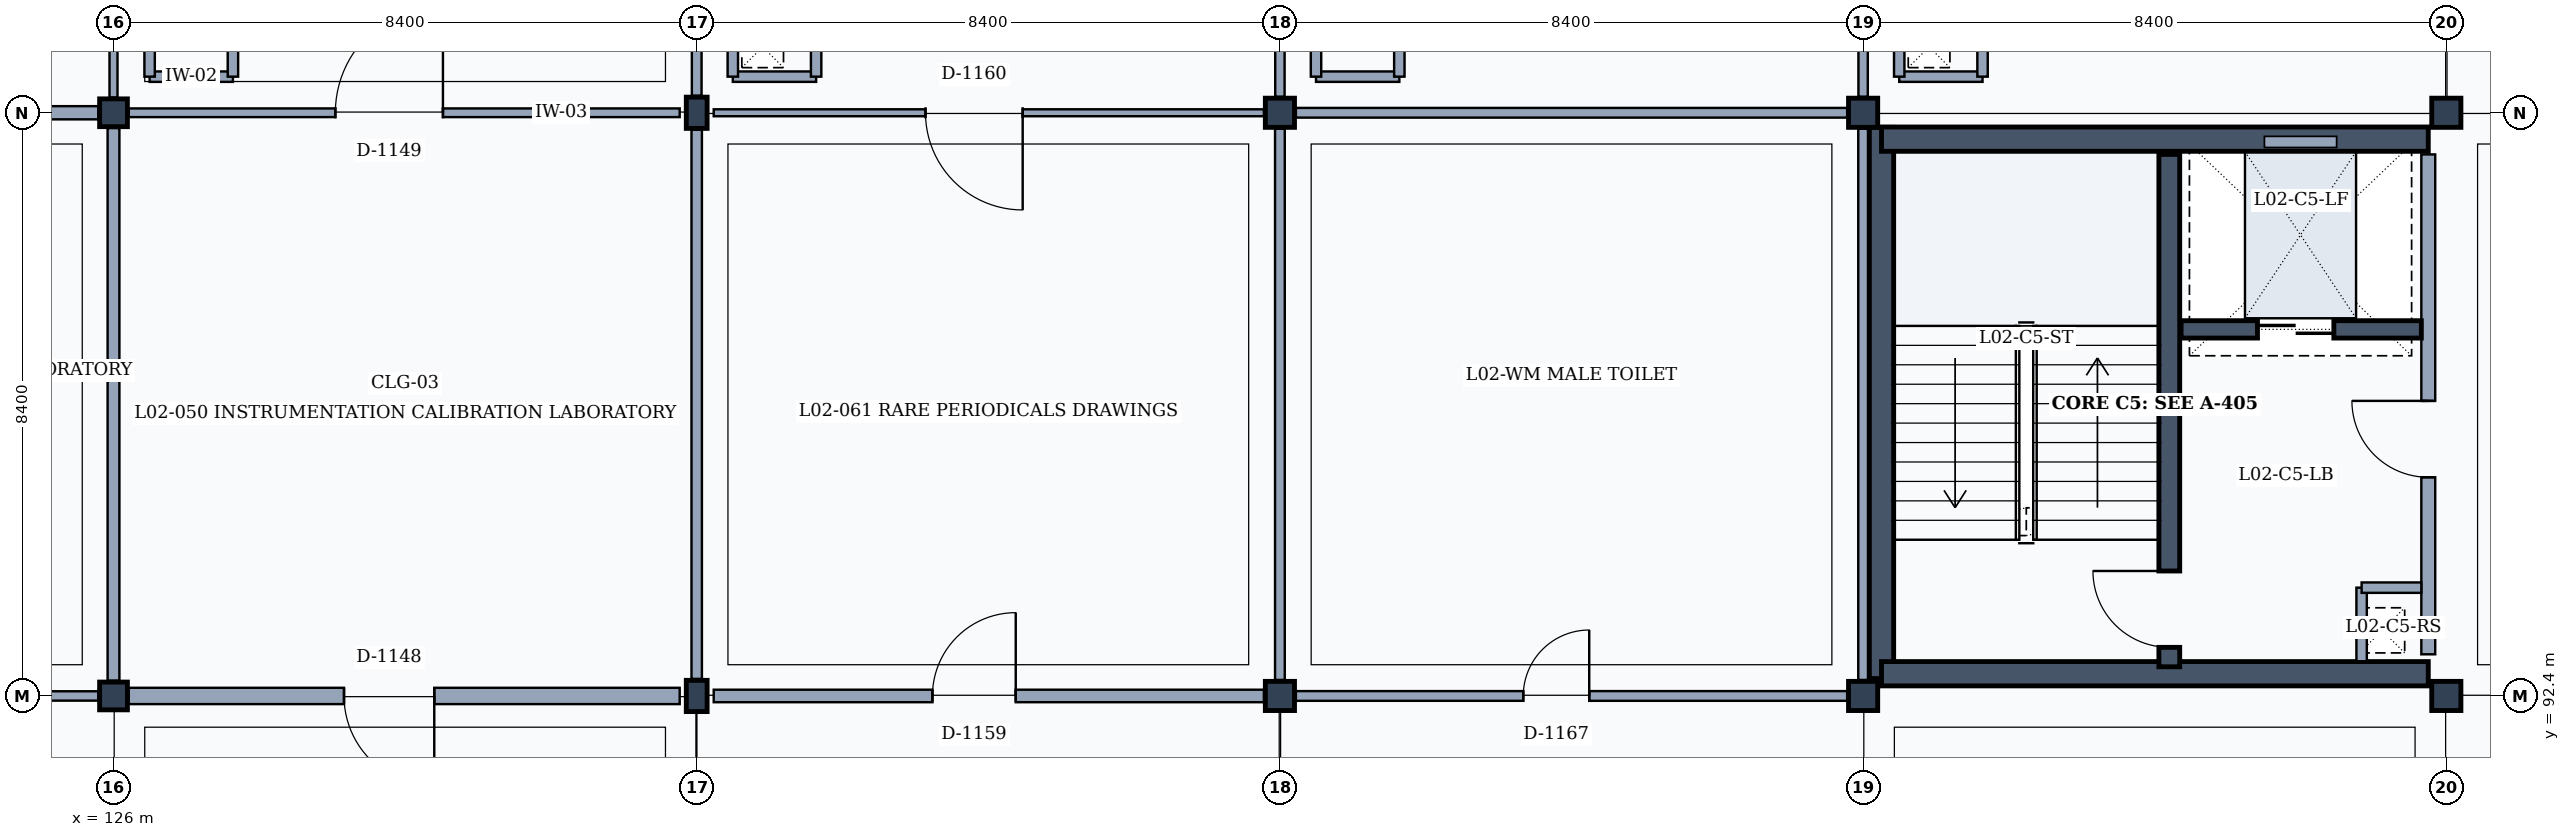
"""IFC4 building model, lengths in metres.
Left out: names, types, materials, properties, quantities, classifications, styles, units other than length and angle.
Written with IfcOpenShell. Run it as: python <this file> out.ifc"""

import sys

from ifc_helpers import new_model, si_unit, direction, frame, frame_2d, origin, origin_2d, place, context, subcontext, project, spatial, rectangle, i_section, extrude, element, fill, save


model = new_model("IFC4")
c1 = context("Model", 3, precision=1e-05, world=origin(), true_north=direction((0.0, 1.0)))
c2 = subcontext(c1, "Body", "Model", "MODEL_VIEW")
j1 = project(units=[si_unit("LENGTHUNIT", "METRE"), si_unit("PLANEANGLEUNIT", "RADIAN")], contexts=[c1])
p1 = place(None, origin())
s1 = spatial("IfcSite", under=j1, at=p1, CompositionType="ELEMENT")
p2 = place(p1, origin())
s2 = spatial("IfcBuilding", under=s1, at=p2, CompositionType="ELEMENT")
p3 = place(p2, frame((0.0, 0.0, 9.6)))
s3 = spatial("IfcBuildingStorey", under=s2, at=p3, CompositionType="ELEMENT", Elevation=9.6)
for number, where, z_axis, x_axis in (
    (1, (126.0, 92.4, 0.0), (0.0, 0.0, 1.0), (1.0, 0.0, 0.0)),
    (2, (126.0, 100.8, 0.0), (0.0, 0.0, 1.0), (1.0, 0.0, 0.0)),
):
    element("IfcColumn", number, at=place(p3, frame(where, z_axis=z_axis, x_axis=x_axis)), inside=s3, PredefinedType="COLUMN", context=c2, shape_type="SweptSolid", body=[
        extrude(rectangle(XDim=0.4, YDim=0.4, at=origin_2d()), origin(), (0.0, 0.0, 1.0), 4.2),
    ])
for number, where, z_axis, x_axis in (
    (3, (134.4, 92.4, 0.0), (0.0, 0.0, 1.0), (1.0, 0.0, 0.0)),
    (4, (134.4, 100.8, 0.0), (0.0, 0.0, 1.0), (1.0, 0.0, 0.0)),
):
    element("IfcColumn", number, at=place(p3, frame(where, z_axis=z_axis, x_axis=x_axis)), inside=s3, PredefinedType="COLUMN", context=c2, shape_type="SweptSolid", body=[
        extrude(i_section(OverallWidth=0.3, OverallDepth=0.45, WebThickness=0.014, FlangeThickness=0.026, FilletRadius=0.027, at=origin_2d()), origin(), (0.0, 0.0, 1.0), 4.2),
    ])
for number, where, z_axis, x_axis in (
    (5, (142.8, 92.4, 0.0), (0.0, 0.0, 1.0), (1.0, 0.0, 0.0)),
    (6, (142.8, 100.8, 0.0), (0.0, 0.0, 1.0), (1.0, 0.0, 0.0)),
    (7, (151.2, 92.4, 0.0), (0.0, 0.0, 1.0), (1.0, 0.0, 0.0)),
    (8, (151.2, 100.8, 0.0), (0.0, 0.0, 1.0), (1.0, 0.0, 0.0)),
    (9, (159.6, 92.4, 0.0), (0.0, 0.0, 1.0), (1.0, 0.0, 0.0)),
    (10, (159.6, 100.8, 0.0), (0.0, 0.0, 1.0), (1.0, 0.0, 0.0)),
):
    element("IfcColumn", number, at=place(p3, frame(where, z_axis=z_axis, x_axis=x_axis)), inside=s3, PredefinedType="COLUMN", context=c2, shape_type="SweptSolid", body=[
        extrude(rectangle(XDim=0.42, YDim=0.42, at=origin_2d()), origin(), (0.0, 0.0, 1.0), 4.2),
    ])
p4 = place(p3, frame((151.465, 92.65, 0.0), z_axis=(0.0, 0.0, 1.0), x_axis=(0.0, 1.0, 0.0)))
e11 = element("IfcWall", 11, at=p4, inside=s3, PredefinedType="SHEAR", context=c2, shape_type="SweptSolid", body=[
    extrude(rectangle(XDim=7.94, YDim=0.35, at=frame_2d((3.97, 0.0))), origin(), (0.0, 0.0, 1.0), 3.96),
])
p5 = place(p3, frame((151.465, 100.42, 0.0), z_axis=(0.0, 0.0, 1.0), x_axis=(1.0, 0.0, 0.0)))
e12 = element("IfcWall", 12, at=p5, inside=s3, PredefinedType="SHEAR", context=c2, shape_type="SweptSolid", body=[
    extrude(rectangle(XDim=7.875, YDim=0.35, at=frame_2d((3.938, 0.0))), origin(), (0.0, 0.0, 1.0), 3.96),
])
p6 = place(p3, frame((159.34, 100.2, 0.0), z_axis=(0.0, 0.0, 1.0), x_axis=(0.0, -1.0, 0.0)))
e13 = element("IfcWall", 13, at=p6, inside=s3, PredefinedType="PARTITIONING", context=c2, shape_type="SweptSolid", body=[
    extrude(rectangle(XDim=7.2, YDim=0.2, at=frame_2d((3.6, 0.0))), origin(), (0.0, 0.0, 1.0), 3.32),
])
p7 = place(p6, frame((3.55, 0.0, 0.0)))
e14 = element("IfcOpeningElement", 14, at=p7, cuts=e13, PredefinedType="OPENING", context=c2, shape_type="SweptSolid", body=[
    extrude(rectangle(XDim=1.1, YDim=2.15, at=frame_2d((0.55, 1.075))), frame((0.0, 0.11, 0.0), z_axis=(0.0, -1.0, 0.0), x_axis=(1.0, 0.0, 0.0)), (0.0, 0.0, 1.0), 0.22),
])
p8 = place(p3, frame((159.34, 92.72, 0.0), z_axis=(0.0, 0.0, 1.0), x_axis=(-1.0, 0.0, 0.0)))
e15 = element("IfcWall", 15, at=p8, inside=s3, PredefinedType="SHEAR", context=c2, shape_type="SweptSolid", body=[
    extrude(rectangle(XDim=7.875, YDim=0.35, at=frame_2d((3.938, 0.0))), origin(), (0.0, 0.0, 1.0), 3.96),
])
p9 = place(p3, frame((155.61, 92.82, 0.0), z_axis=(0.0, 0.0, 1.0), x_axis=(0.0, 1.0, 0.0)))
e16 = element("IfcWall", 16, at=p9, inside=s3, PredefinedType="SHEAR", context=c2, shape_type="SweptSolid", body=[
    extrude(rectangle(XDim=7.38, YDim=0.3, at=frame_2d((3.69, 0.0))), origin(), (0.0, 0.0, 1.0), 3.96),
])
p10 = place(p9, frame((0.28, 0.0, 0.0)))
e17 = element("IfcOpeningElement", 17, at=p10, cuts=e16, PredefinedType="OPENING", context=c2, shape_type="SweptSolid", body=[
    extrude(rectangle(XDim=1.1, YDim=2.15, at=frame_2d((0.55, 1.075))), frame((0.0, 0.16, 0.0), z_axis=(0.0, -1.0, 0.0), x_axis=(1.0, 0.0, 0.0)), (0.0, 0.0, 1.0), 0.32),
])
p11 = place(p3, frame((158.38, 93.96, 0.0), z_axis=(0.0, 0.0, 1.0), x_axis=(0.0, -1.0, 0.0)))
e18 = element("IfcWall", 18, at=p11, inside=s3, PredefinedType="PARTITIONING", context=c2, shape_type="SweptSolid", body=[
    extrude(rectangle(XDim=1.06, YDim=0.15, at=frame_2d((0.53, 0.0))), origin(), (0.0, 0.0, 1.0), 3.32),
])
p12 = place(p3, frame((158.38, 93.96, 0.0), z_axis=(0.0, 0.0, 1.0), x_axis=(1.0, 0.0, 0.0)))
e19 = element("IfcWall", 19, at=p12, inside=s3, PredefinedType="PARTITIONING", context=c2, shape_type="SweptSolid", body=[
    extrude(rectangle(XDim=0.86, YDim=0.15, at=frame_2d((0.43, 0.0))), origin(), (0.0, 0.0, 1.0), 3.32),
])
p13 = place(p3, frame((155.78, 97.68, 0.0), z_axis=(0.0, 0.0, 1.0), x_axis=(1.0, 0.0, 0.0)))
e20 = element("IfcWall", 20, at=p13, inside=s3, PredefinedType="SHEAR", context=c2, shape_type="SweptSolid", body=[
    extrude(rectangle(XDim=3.46, YDim=0.25, at=frame_2d((1.73, 0.0))), origin(), (0.0, 0.0, 1.0), 3.96),
])
p14 = place(p13, frame((1.1, 0.0, 0.0)))
e21 = element("IfcOpeningElement", 21, at=p14, cuts=e20, PredefinedType="OPENING", context=c2, shape_type="SweptSolid", body=[
    extrude(rectangle(XDim=1.1, YDim=2.15, at=frame_2d((0.55, 1.075))), frame((0.0, 0.135, 0.0), z_axis=(0.0, -1.0, 0.0), x_axis=(1.0, 0.0, 0.0)), (0.0, 0.0, 1.0), 0.27),
])
for number, where, z_axis, x_axis in (
    (22, (126.52, 101.32, 0.0), (0.0, 0.0, 1.0), (1.0, 0.0, 0.0)),
    (23, (127.72, 101.32, 0.0), (0.0, 0.0, 1.0), (0.0, 1.0, 0.0)),
    (24, (126.52, 102.52, 0.0), (0.0, 0.0, 1.0), (0.0, -1.0, 0.0)),
):
    element("IfcWall", number, at=place(p3, frame(where, z_axis=z_axis, x_axis=x_axis)), inside=s3, PredefinedType="PARTITIONING", context=c2, shape_type="SweptSolid", body=[
        extrude(rectangle(XDim=1.2, YDim=0.15, at=frame_2d((0.6, 0.0))), origin(), (0.0, 0.0, 1.0), 3.96),
    ])
p15 = place(p3, frame((134.92, 101.32, 0.0), z_axis=(0.0, 0.0, 1.0), x_axis=(1.0, 0.0, 0.0)))
e25 = element("IfcWall", 25, at=p15, inside=s3, PredefinedType="PARTITIONING", context=c2, shape_type="SweptSolid", body=[
    extrude(rectangle(XDim=1.2, YDim=0.15, at=frame_2d((0.6, 0.0))), origin(), (0.0, 0.0, 1.0), 3.94),
])
for number, where, z_axis, x_axis in (
    (26, (136.12, 101.32, 0.0), (0.0, 0.0, 1.0), (0.0, 1.0, 0.0)),
    (27, (134.92, 102.52, 0.0), (0.0, 0.0, 1.0), (0.0, -1.0, 0.0)),
):
    element("IfcWall", number, at=place(p3, frame(where, z_axis=z_axis, x_axis=x_axis)), inside=s3, PredefinedType="PARTITIONING", context=c2, shape_type="SweptSolid", body=[
        extrude(rectangle(XDim=1.2, YDim=0.15, at=frame_2d((0.6, 0.0))), origin(), (0.0, 0.0, 1.0), 3.94),
    ])
for number, where, z_axis, x_axis in (
    (28, (143.32, 101.32, 0.0), (0.0, 0.0, 1.0), (1.0, 0.0, 0.0)),
    (29, (144.52, 101.32, 0.0), (0.0, 0.0, 1.0), (0.0, 1.0, 0.0)),
    (30, (143.32, 102.52, 0.0), (0.0, 0.0, 1.0), (0.0, -1.0, 0.0)),
    (31, (151.72, 101.32, 0.0), (0.0, 0.0, 1.0), (1.0, 0.0, 0.0)),
    (32, (152.92, 101.32, 0.0), (0.0, 0.0, 1.0), (0.0, 1.0, 0.0)),
    (33, (151.72, 102.52, 0.0), (0.0, 0.0, 1.0), (0.0, -1.0, 0.0)),
):
    element("IfcWall", number, at=place(p3, frame(where, z_axis=z_axis, x_axis=x_axis)), inside=s3, PredefinedType="PARTITIONING", context=c2, shape_type="SweptSolid", body=[
        extrude(rectangle(XDim=1.2, YDim=0.15, at=frame_2d((0.6, 0.0))), origin(), (0.0, 0.0, 1.0), 3.96),
    ])
p16 = place(p3, frame((117.81, 92.4, 0.0), z_axis=(0.0, 0.0, 1.0), x_axis=(1.0, 0.0, 0.0)))
e34 = element("IfcWall", 34, at=p16, inside=s3, PredefinedType="PARTITIONING", context=c2, shape_type="SweptSolid", body=[
    extrude(rectangle(XDim=7.97, YDim=0.135, at=frame_2d((3.985, 0.0))), origin(), (0.0, 0.0, 1.0), 3.32),
])
p17 = place(p16, frame((3.0, 0.0, 0.0)))
e35 = element("IfcOpeningElement", 35, at=p17, cuts=e34, PredefinedType="OPENING", context=c2, shape_type="SweptSolid", body=[
    extrude(rectangle(XDim=1.5, YDim=2.3, at=frame_2d((0.75, 1.15))), frame((0.0, 0.077, 0.0), z_axis=(0.0, -1.0, 0.0), x_axis=(1.0, 0.0, 0.0)), (0.0, 0.0, 1.0), 0.155),
])
p18 = place(p3, frame((126.0, 92.62, 0.0), z_axis=(0.0, 0.0, 1.0), x_axis=(0.0, 1.0, 0.0)))
e36 = element("IfcWall", 36, at=p18, inside=s3, PredefinedType="PARTITIONING", context=c2, shape_type="SweptSolid", body=[
    extrude(rectangle(XDim=7.96, YDim=0.17, at=frame_2d((3.98, 0.0))), origin(), (0.0, 0.0, 1.0), 3.32),
])
p19 = place(p3, frame((117.745, 100.8, 0.0), z_axis=(0.0, 0.0, 1.0), x_axis=(1.0, 0.0, 0.0)))
e37 = element("IfcWall", 37, at=p19, inside=s3, PredefinedType="PARTITIONING", context=c2, shape_type="SweptSolid", body=[
    extrude(rectangle(XDim=8.035, YDim=0.19, at=frame_2d((4.018, 0.0))), origin(), (0.0, 0.0, 1.0), 3.32),
])
p20 = place(p19, frame((2.925, 0.0, 0.0)))
e38 = element("IfcOpeningElement", 38, at=p20, cuts=e37, PredefinedType="OPENING", context=c2, shape_type="SweptSolid", body=[
    extrude(rectangle(XDim=1.65, YDim=2.25, at=frame_2d((0.825, 1.125))), frame((0.0, 0.105, 0.0), z_axis=(0.0, -1.0, 0.0), x_axis=(1.0, 0.0, 0.0)), (0.0, 0.0, 1.0), 0.21),
])
p21 = place(p3, frame((126.0, 101.02, 0.0), z_axis=(0.0, 0.0, 1.0), x_axis=(0.0, 1.0, 0.0)))
e39 = element("IfcWall", 39, at=p21, inside=s3, PredefinedType="PARTITIONING", context=c2, shape_type="SweptSolid", body=[
    extrude(rectangle(XDim=7.96, YDim=0.115, at=frame_2d((3.98, 0.0))), origin(), (0.0, 0.0, 1.0), 3.32),
])
p22 = place(p3, frame((126.22, 92.4, 0.0), z_axis=(0.0, 0.0, 1.0), x_axis=(1.0, 0.0, 0.0)))
e40 = element("IfcWall", 40, at=p22, inside=s3, PredefinedType="PARTITIONING", context=c2, shape_type="SweptSolid", body=[
    extrude(rectangle(XDim=7.935, YDim=0.235, at=frame_2d((3.968, 0.0))), origin(), (0.0, 0.0, 1.0), 3.32),
])
p23 = place(p22, frame((3.1, 0.0, 0.0)))
e41 = element("IfcOpeningElement", 41, at=p23, cuts=e40, PredefinedType="OPENING", context=c2, shape_type="SweptSolid", body=[
    extrude(rectangle(XDim=1.3, YDim=2.2, at=frame_2d((0.65, 1.1))), frame((0.0, 0.127, 0.0), z_axis=(0.0, -1.0, 0.0), x_axis=(1.0, 0.0, 0.0)), (0.0, 0.0, 1.0), 0.255),
])
p24 = place(p3, frame((134.4, 92.645, 0.0), z_axis=(0.0, 0.0, 1.0), x_axis=(0.0, 1.0, 0.0)))
e42 = element("IfcWall", 42, at=p24, inside=s3, PredefinedType="PARTITIONING", context=c2, shape_type="SweptSolid", body=[
    extrude(rectangle(XDim=7.91, YDim=0.15, at=frame_2d((3.955, 0.0))), origin(), (0.0, 0.0, 1.0), 3.32),
])
p25 = place(p3, frame((126.22, 100.8, 0.0), z_axis=(0.0, 0.0, 1.0), x_axis=(1.0, 0.0, 0.0)))
e43 = element("IfcWall", 43, at=p25, inside=s3, PredefinedType="PARTITIONING", context=c2, shape_type="SweptSolid", body=[
    extrude(rectangle(XDim=7.935, YDim=0.125, at=frame_2d((3.968, 0.0))), origin(), (0.0, 0.0, 1.0), 3.32),
])
p26 = place(p25, frame((2.975, 0.0, 0.0)))
e44 = element("IfcOpeningElement", 44, at=p26, cuts=e43, PredefinedType="OPENING", context=c2, shape_type="SweptSolid", body=[
    extrude(rectangle(XDim=1.55, YDim=2.35, at=frame_2d((0.775, 1.175))), frame((0.0, 0.073, 0.0), z_axis=(0.0, -1.0, 0.0), x_axis=(1.0, 0.0, 0.0)), (0.0, 0.0, 1.0), 0.145),
])
p27 = place(p3, frame((134.4, 101.045, 0.0), z_axis=(0.0, 0.0, 1.0), x_axis=(0.0, 1.0, 0.0)))
e45 = element("IfcWall", 45, at=p27, inside=s3, PredefinedType="PARTITIONING", context=c2, shape_type="SweptSolid", body=[
    extrude(rectangle(XDim=7.91, YDim=0.14, at=frame_2d((3.955, 0.0))), origin(), (0.0, 0.0, 1.0), 3.32),
])
p28 = place(p3, frame((134.645, 92.4, 0.0), z_axis=(0.0, 0.0, 1.0), x_axis=(1.0, 0.0, 0.0)))
e46 = element("IfcWall", 46, at=p28, inside=s3, PredefinedType="PARTITIONING", context=c2, shape_type="SweptSolid", body=[
    extrude(rectangle(XDim=7.925, YDim=0.18, at=frame_2d((3.962, 0.0))), origin(), (0.0, 0.0, 1.0), 3.32),
])
p29 = place(p28, frame((3.15, 0.0, 0.0)))
e47 = element("IfcOpeningElement", 47, at=p29, cuts=e46, PredefinedType="OPENING", context=c2, shape_type="SweptSolid", body=[
    extrude(rectangle(XDim=1.2, YDim=2.2, at=frame_2d((0.6, 1.1))), frame((0.0, 0.1, 0.0), z_axis=(0.0, -1.0, 0.0), x_axis=(1.0, 0.0, 0.0)), (0.0, 0.0, 1.0), 0.2),
])
p30 = place(p3, frame((142.8, 92.63, 0.0), z_axis=(0.0, 0.0, 1.0), x_axis=(0.0, 1.0, 0.0)))
e48 = element("IfcWall", 48, at=p30, inside=s3, PredefinedType="PARTITIONING", context=c2, shape_type="SweptSolid", body=[
    extrude(rectangle(XDim=7.94, YDim=0.14, at=frame_2d((3.97, 0.0))), origin(), (0.0, 0.0, 1.0), 3.32),
])
p31 = place(p3, frame((134.645, 100.8, 0.0), z_axis=(0.0, 0.0, 1.0), x_axis=(1.0, 0.0, 0.0)))
e49 = element("IfcWall", 49, at=p31, inside=s3, PredefinedType="MOVABLE", context=c2, shape_type="SweptSolid", body=[
    extrude(rectangle(XDim=7.925, YDim=0.1, at=frame_2d((3.962, 0.0))), origin(), (0.0, 0.0, 1.0), 3.32),
])
p32 = place(p31, frame((3.05, 0.0, 0.0)))
e50 = element("IfcOpeningElement", 50, at=p32, cuts=e49, PredefinedType="OPENING", context=c2, shape_type="SweptSolid", body=[
    extrude(rectangle(XDim=1.4, YDim=2.25, at=frame_2d((0.7, 1.125))), frame((0.0, 0.06, 0.0), z_axis=(0.0, -1.0, 0.0), x_axis=(1.0, 0.0, 0.0)), (0.0, 0.0, 1.0), 0.12),
])
p33 = place(p3, frame((142.8, 101.03, 0.0), z_axis=(0.0, 0.0, 1.0), x_axis=(0.0, 1.0, 0.0)))
e51 = element("IfcWall", 51, at=p33, inside=s3, PredefinedType="PARTITIONING", context=c2, shape_type="SweptSolid", body=[
    extrude(rectangle(XDim=7.94, YDim=0.135, at=frame_2d((3.97, 0.0))), origin(), (0.0, 0.0, 1.0), 3.32),
])
p34 = place(p3, frame((143.03, 92.4, 0.0), z_axis=(0.0, 0.0, 1.0), x_axis=(1.0, 0.0, 0.0)))
e52 = element("IfcWall", 52, at=p34, inside=s3, PredefinedType="PARTITIONING", context=c2, shape_type="SweptSolid", body=[
    extrude(rectangle(XDim=7.94, YDim=0.14, at=frame_2d((3.97, 0.0))), origin(), (0.0, 0.0, 1.0), 3.22),
])
p35 = place(p34, frame((3.275, 0.0, 0.0)))
e53 = element("IfcOpeningElement", 53, at=p35, cuts=e52, PredefinedType="OPENING", context=c2, shape_type="SweptSolid", body=[
    extrude(rectangle(XDim=0.95, YDim=2.15, at=frame_2d((0.475, 1.075))), frame((0.0, 0.08, 0.0), z_axis=(0.0, -1.0, 0.0), x_axis=(1.0, 0.0, 0.0)), (0.0, 0.0, 1.0), 0.16),
])
p36 = place(p3, frame((151.2, 92.63, 0.0), z_axis=(0.0, 0.0, 1.0), x_axis=(0.0, 1.0, 0.0)))
e54 = element("IfcWall", 54, at=p36, inside=s3, PredefinedType="PARTITIONING", context=c2, shape_type="SweptSolid", body=[
    extrude(rectangle(XDim=7.94, YDim=0.14, at=frame_2d((3.97, 0.0))), origin(), (0.0, 0.0, 1.0), 3.32),
])
p37 = place(p3, frame((143.03, 100.8, 0.0), z_axis=(0.0, 0.0, 1.0), x_axis=(1.0, 0.0, 0.0)))
e55 = element("IfcWall", 55, at=p37, inside=s3, PredefinedType="PARTITIONING", context=c2, shape_type="SweptSolid", body=[
    extrude(rectangle(XDim=7.94, YDim=0.14, at=frame_2d((3.97, 0.0))), origin(), (0.0, 0.0, 1.0), 3.22),
])
p38 = place(p3, frame((151.2, 101.03, 0.0), z_axis=(0.0, 0.0, 1.0), x_axis=(0.0, 1.0, 0.0)))
e56 = element("IfcWall", 56, at=p38, inside=s3, PredefinedType="PARTITIONING", context=c2, shape_type="SweptSolid", body=[
    extrude(rectangle(XDim=7.94, YDim=0.135, at=frame_2d((3.97, 0.0))), origin(), (0.0, 0.0, 1.0), 3.32),
])
p39 = place(p38, frame((2.8, 0.0, 0.0)))
e57 = element("IfcOpeningElement", 57, at=p39, cuts=e56, PredefinedType="OPENING", context=c2, shape_type="SweptSolid", body=[
    extrude(rectangle(XDim=1.9, YDim=2.4, at=frame_2d((0.95, 1.2))), frame((0.0, 0.077, 0.0), z_axis=(0.0, -1.0, 0.0), x_axis=(1.0, 0.0, 0.0)), (0.0, 0.0, 1.0), 0.155),
])
p40 = place(p7, frame((1.1, 0.0, 0.0), z_axis=(0.0, 0.0, 1.0), x_axis=(-1.0, 0.0, 0.0)))
e58 = element("IfcDoor", 58, at=p40, inside=s3, OperationType="SINGLE_SWING_RIGHT", PredefinedType="DOOR", context=c2, shape_type="SweptSolid", body=[
    extrude(rectangle(XDim=1.1, YDim=2.15, at=frame_2d((0.55, 1.075))), frame((0.0, 0.025, 0.0), z_axis=(0.0, -1.0, 0.0), x_axis=(1.0, 0.0, 0.0)), (0.0, 0.0, 1.0), 0.05),
])
fill(e14, e58)
p41 = place(p10, origin())
e59 = element("IfcDoor", 59, at=p41, inside=s3, OperationType="SINGLE_SWING_RIGHT", PredefinedType="DOOR", context=c2, shape_type="SweptSolid", body=[
    extrude(rectangle(XDim=1.1, YDim=2.15, at=frame_2d((0.55, 1.075))), frame((0.0, 0.025, 0.0), z_axis=(0.0, -1.0, 0.0), x_axis=(1.0, 0.0, 0.0)), (0.0, 0.0, 1.0), 0.05),
])
fill(e17, e59)
p42 = place(p14, origin())
e60 = element("IfcDoor", 60, at=p42, inside=s3, OperationType="DOUBLE_DOOR_SLIDING", PredefinedType="DOOR", context=c2, shape_type="SweptSolid", body=[
    extrude(rectangle(XDim=1.1, YDim=2.15, at=frame_2d((0.55, 1.075))), frame((0.0, 0.025, 0.0), z_axis=(0.0, -1.0, 0.0), x_axis=(1.0, 0.0, 0.0)), (0.0, 0.0, 1.0), 0.05),
])
fill(e21, e60)
p43 = place(p23, frame((1.3, 0.0, 0.0), z_axis=(0.0, 0.0, 1.0), x_axis=(-1.0, 0.0, 0.0)))
e61 = element("IfcDoor", 61, at=p43, inside=s3, OperationType="SINGLE_SWING_LEFT", PredefinedType="DOOR", context=c2, shape_type="SweptSolid", body=[
    extrude(rectangle(XDim=1.3, YDim=2.2, at=frame_2d((0.65, 1.1))), frame((0.0, 0.025, 0.0), z_axis=(0.0, -1.0, 0.0), x_axis=(1.0, 0.0, 0.0)), (0.0, 0.0, 1.0), 0.05),
])
fill(e41, e61)
p44 = place(p26, origin())
e62 = element("IfcDoor", 62, at=p44, inside=s3, OperationType="SINGLE_SWING_RIGHT", PredefinedType="DOOR", context=c2, shape_type="SweptSolid", body=[
    extrude(rectangle(XDim=1.55, YDim=2.35, at=frame_2d((0.775, 1.175))), frame((0.0, 0.025, 0.0), z_axis=(0.0, -1.0, 0.0), x_axis=(1.0, 0.0, 0.0)), (0.0, 0.0, 1.0), 0.05),
])
fill(e44, e62)
p45 = place(p29, origin())
e63 = element("IfcDoor", 63, at=p45, inside=s3, OperationType="SINGLE_SWING_RIGHT", PredefinedType="DOOR", context=c2, shape_type="SweptSolid", body=[
    extrude(rectangle(XDim=1.2, YDim=2.2, at=frame_2d((0.6, 1.1))), frame((0.0, 0.025, 0.0), z_axis=(0.0, -1.0, 0.0), x_axis=(1.0, 0.0, 0.0)), (0.0, 0.0, 1.0), 0.05),
])
fill(e47, e63)
p46 = place(p32, frame((1.4, 0.0, 0.0), z_axis=(0.0, 0.0, 1.0), x_axis=(-1.0, 0.0, 0.0)))
e64 = element("IfcDoor", 64, at=p46, inside=s3, OperationType="SINGLE_SWING_LEFT", PredefinedType="DOOR", context=c2, shape_type="SweptSolid", body=[
    extrude(rectangle(XDim=1.4, YDim=2.25, at=frame_2d((0.7, 1.125))), frame((0.0, 0.025, 0.0), z_axis=(0.0, -1.0, 0.0), x_axis=(1.0, 0.0, 0.0)), (0.0, 0.0, 1.0), 0.05),
])
fill(e50, e64)
p47 = place(p35, origin())
e65 = element("IfcDoor", 65, at=p47, inside=s3, OperationType="SINGLE_SWING_RIGHT", PredefinedType="DOOR", context=c2, shape_type="SweptSolid", body=[
    extrude(rectangle(XDim=0.95, YDim=2.15, at=frame_2d((0.475, 1.075))), frame((0.0, 0.025, 0.0), z_axis=(0.0, -1.0, 0.0), x_axis=(1.0, 0.0, 0.0)), (0.0, 0.0, 1.0), 0.05),
])
fill(e53, e65)
save(model, sys.argv[1])
